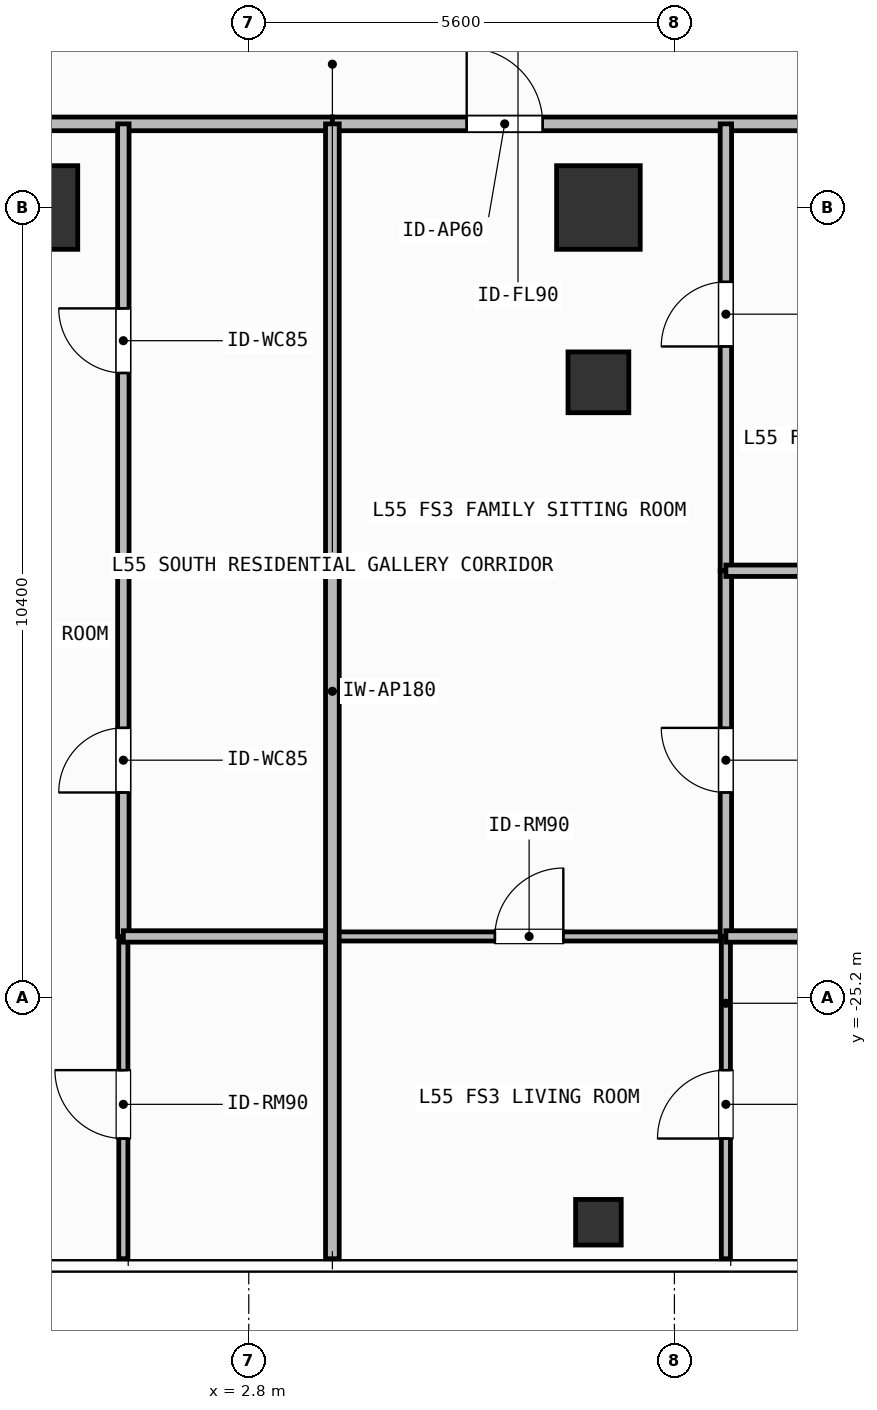
"""IFC4 building model, lengths in metres.
Left out: names, types, materials, properties, quantities, classifications, styles, units other than length and angle.
Written with IfcOpenShell. Run it as: python <this file> out.ifc"""

import sys

from ifc_helpers import new_model, si_unit, direction, frame, frame_2d, origin, origin_2d, place, context, subcontext, project, spatial, rectangle, hollow_rectangle, extrude, element, fill, save


model = new_model("IFC4")
c1 = context("Model", 3, precision=1e-05, world=origin(), true_north=direction((0.0, 1.0)))
c2 = subcontext(c1, "Body", "Model", "MODEL_VIEW")
j1 = project(units=[si_unit("LENGTHUNIT", "METRE"), si_unit("PLANEANGLEUNIT", "RADIAN")], contexts=[c1])
p1 = place(None, origin())
s1 = spatial("IfcSite", under=j1, at=p1, CompositionType="ELEMENT")
p2 = place(p1, origin())
s2 = spatial("IfcBuilding", under=s1, at=p2, CompositionType="ELEMENT")
p3 = place(p2, frame((0.0, 0.0, 223.5)))
s3 = spatial("IfcBuildingStorey", under=s2, at=p3, CompositionType="ELEMENT", Elevation=223.5)
for number, where, z_axis, x_axis in (
    (1, (0.0, -14.8, 0.0), (0.0, 0.0, 1.0), (1.0, 0.0, 0.0)),
    (2, (7.4, -14.8, 0.0), (0.0, 0.0, 1.0), (1.0, 0.0, 0.0)),
):
    element("IfcColumn", number, at=place(p3, frame(where, z_axis=z_axis, x_axis=x_axis)), inside=s3, PredefinedType="COLUMN", context=c2, shape_type="SweptSolid", body=[
        extrude(rectangle(XDim=1.1, YDim=1.1, at=origin_2d()), origin(), (0.0, 0.0, 1.0), 3.9),
    ])
p4 = place(p3, frame((7.4, -17.1, 0.0), z_axis=(0.0, 0.0, 1.0), x_axis=(1.0, 0.0, 0.0)))
e3 = element("IfcColumn", 3, at=p4, inside=s3, PredefinedType="COLUMN", context=c2, shape_type="SweptSolid", body=[
    extrude(hollow_rectangle(XDim=0.8, YDim=0.8, WallThickness=0.036, at=origin_2d()), origin(), (0.0, 0.0, 1.0), 3.9),
])
p5 = place(p3, frame((7.4, -28.15, 0.0), z_axis=(0.0, 0.0, 1.0), x_axis=(1.0, 0.0, 0.0)))
e4 = element("IfcColumn", 4, at=p5, inside=s3, PredefinedType="COLUMN", context=c2, shape_type="SweptSolid", body=[
    extrude(hollow_rectangle(XDim=0.6, YDim=0.6, WallThickness=0.028, at=origin_2d()), origin(), (0.0, 0.0, 1.0), 3.9),
])
p6 = place(p3, frame((-2.154, -13.7, 0.0), z_axis=(0.0, 0.0, 1.0), x_axis=(1.0, 0.0, 0.0)))
e5 = element("IfcWall", 5, at=p6, inside=s3, PredefinedType="PARTITIONING", context=c2, shape_type="SweptSolid", body=[
    extrude(rectangle(XDim=6.054, YDim=0.18, at=frame_2d((3.027, 0.0))), origin(), (0.0, 0.0, 1.0), 3.68),
])
p7 = place(p6, frame((0.511, 0.0, 0.0)))
e6 = element("IfcOpeningElement", 6, at=p7, cuts=e5, PredefinedType="OPENING", context=c2, shape_type="SweptSolid", body=[
    extrude(rectangle(XDim=1.0, YDim=2.2, at=frame_2d((0.5, 1.1))), frame((0.0, 0.1, 0.0), z_axis=(0.0, -1.0, 0.0), x_axis=(1.0, 0.0, 0.0)), (0.0, 0.0, 1.0), 0.2),
])
p8 = place(p3, frame((1.15, -19.579, 0.0), z_axis=(0.0, 0.0, 1.0), x_axis=(0.0, 1.0, 0.0)))
e7 = element("IfcWall", 7, at=p8, inside=s3, PredefinedType="PARTITIONING", context=c2, shape_type="SweptSolid", body=[
    extrude(rectangle(XDim=5.879, YDim=0.15, at=frame_2d((2.939, 0.0))), origin(), (0.0, 0.0, 1.0), 3.68),
])
p9 = place(p8, frame((2.602, 0.0, 0.0)))
e8 = element("IfcOpeningElement", 8, at=p9, cuts=e7, PredefinedType="OPENING", context=c2, shape_type="SweptSolid", body=[
    extrude(rectangle(XDim=0.85, YDim=2.1, at=frame_2d((0.425, 1.05))), frame((0.0, 0.085, 0.0), z_axis=(0.0, -1.0, 0.0), x_axis=(1.0, 0.0, 0.0)), (0.0, 0.0, 1.0), 0.17),
])
p10 = place(p3, frame((1.15, -24.39, 0.0), z_axis=(0.0, 0.0, 1.0), x_axis=(0.0, 1.0, 0.0)))
e9 = element("IfcWall", 9, at=p10, inside=s3, PredefinedType="PARTITIONING", context=c2, shape_type="SweptSolid", body=[
    extrude(rectangle(XDim=4.811, YDim=0.15, at=frame_2d((2.405, 0.0))), origin(), (0.0, 0.0, 1.0), 3.68),
])
p11 = place(p10, frame((1.894, 0.0, 0.0)))
e10 = element("IfcOpeningElement", 10, at=p11, cuts=e9, PredefinedType="OPENING", context=c2, shape_type="SweptSolid", body=[
    extrude(rectangle(XDim=0.85, YDim=2.1, at=frame_2d((0.425, 1.05))), frame((0.0, 0.085, 0.0), z_axis=(0.0, -1.0, 0.0), x_axis=(1.0, 0.0, 0.0)), (0.0, 0.0, 1.0), 0.17),
])
p12 = place(p3, frame((1.15, -28.63, 0.0), z_axis=(0.0, 0.0, 1.0), x_axis=(0.0, 1.0, 0.0)))
e11 = element("IfcWall", 11, at=p12, inside=s3, PredefinedType="PARTITIONING", context=c2, shape_type="SweptSolid", body=[
    extrude(rectangle(XDim=4.24, YDim=0.12, at=frame_2d((2.12, 0.0))), origin(), (0.0, 0.0, 1.0), 3.68),
])
p13 = place(p12, frame((1.581, 0.0, 0.0)))
e12 = element("IfcOpeningElement", 12, at=p13, cuts=e11, PredefinedType="OPENING", context=c2, shape_type="SweptSolid", body=[
    extrude(rectangle(XDim=0.9, YDim=2.1, at=frame_2d((0.45, 1.05))), frame((0.0, 0.07, 0.0), z_axis=(0.0, -1.0, 0.0), x_axis=(1.0, 0.0, 0.0)), (0.0, 0.0, 1.0), 0.14),
])
p14 = place(p3, frame((3.9, -13.7, 0.0), z_axis=(0.0, 0.0, 1.0), x_axis=(1.0, 0.0, 0.0)))
e13 = element("IfcWall", 13, at=p14, inside=s3, PredefinedType="PARTITIONING", context=c2, shape_type="SweptSolid", body=[
    extrude(rectangle(XDim=7.927, YDim=0.18, at=frame_2d((3.963, 0.0))), origin(), (0.0, 0.0, 1.0), 3.68),
])
p15 = place(p14, frame((1.767, 0.0, 0.0)))
e14 = element("IfcOpeningElement", 14, at=p15, cuts=e13, PredefinedType="OPENING", context=c2, shape_type="SweptSolid", body=[
    extrude(rectangle(XDim=1.0, YDim=2.2, at=frame_2d((0.5, 1.1))), frame((0.0, 0.1, 0.0), z_axis=(0.0, -1.0, 0.0), x_axis=(1.0, 0.0, 0.0)), (0.0, 0.0, 1.0), 0.2),
])
p16 = place(p3, frame((3.9, -24.39, 0.0), z_axis=(0.0, 0.0, 1.0), x_axis=(1.0, 0.0, 0.0)))
e15 = element("IfcWall", 15, at=p16, inside=s3, PredefinedType="PARTITIONING", context=c2, shape_type="SweptSolid", body=[
    extrude(rectangle(XDim=5.177, YDim=0.12, at=frame_2d((2.588, 0.0))), origin(), (0.0, 0.0, 1.0), 3.68),
])
p17 = place(p16, frame((2.138, 0.0, 0.0)))
e16 = element("IfcOpeningElement", 16, at=p17, cuts=e15, PredefinedType="OPENING", context=c2, shape_type="SweptSolid", body=[
    extrude(rectangle(XDim=0.9, YDim=2.1, at=frame_2d((0.45, 1.05))), frame((0.0, 0.07, 0.0), z_axis=(0.0, -1.0, 0.0), x_axis=(1.0, 0.0, 0.0)), (0.0, 0.0, 1.0), 0.14),
])
p18 = place(p3, frame((9.077, -19.579, 0.0), z_axis=(0.0, 0.0, 1.0), x_axis=(0.0, 1.0, 0.0)))
e17 = element("IfcWall", 17, at=p18, inside=s3, PredefinedType="PARTITIONING", context=c2, shape_type="SweptSolid", body=[
    extrude(rectangle(XDim=5.879, YDim=0.15, at=frame_2d((2.939, 0.0))), origin(), (0.0, 0.0, 1.0), 3.68),
])
p19 = place(p18, frame((2.95, 0.0, 0.0)))
e18 = element("IfcOpeningElement", 18, at=p19, cuts=e17, PredefinedType="OPENING", context=c2, shape_type="SweptSolid", body=[
    extrude(rectangle(XDim=0.85, YDim=2.1, at=frame_2d((0.425, 1.05))), frame((0.0, 0.085, 0.0), z_axis=(0.0, -1.0, 0.0), x_axis=(1.0, 0.0, 0.0)), (0.0, 0.0, 1.0), 0.17),
])
p20 = place(p3, frame((9.077, -24.39, 0.0), z_axis=(0.0, 0.0, 1.0), x_axis=(0.0, 1.0, 0.0)))
e19 = element("IfcWall", 19, at=p20, inside=s3, PredefinedType="PARTITIONING", context=c2, shape_type="SweptSolid", body=[
    extrude(rectangle(XDim=4.811, YDim=0.15, at=frame_2d((2.405, 0.0))), origin(), (0.0, 0.0, 1.0), 3.68),
])
p21 = place(p20, frame((1.894, 0.0, 0.0)))
e20 = element("IfcOpeningElement", 20, at=p21, cuts=e19, PredefinedType="OPENING", context=c2, shape_type="SweptSolid", body=[
    extrude(rectangle(XDim=0.85, YDim=2.1, at=frame_2d((0.425, 1.05))), frame((0.0, 0.085, 0.0), z_axis=(0.0, -1.0, 0.0), x_axis=(1.0, 0.0, 0.0)), (0.0, 0.0, 1.0), 0.17),
])
p22 = place(p3, frame((9.077, -28.63, 0.0), z_axis=(0.0, 0.0, 1.0), x_axis=(0.0, 1.0, 0.0)))
e21 = element("IfcWall", 21, at=p22, inside=s3, PredefinedType="PARTITIONING", context=c2, shape_type="SweptSolid", body=[
    extrude(rectangle(XDim=4.24, YDim=0.12, at=frame_2d((2.12, 0.0))), origin(), (0.0, 0.0, 1.0), 3.68),
])
p23 = place(p22, frame((1.581, 0.0, 0.0)))
e22 = element("IfcOpeningElement", 22, at=p23, cuts=e21, PredefinedType="OPENING", context=c2, shape_type="SweptSolid", body=[
    extrude(rectangle(XDim=0.9, YDim=2.1, at=frame_2d((0.45, 1.05))), frame((0.0, 0.07, 0.0), z_axis=(0.0, -1.0, 0.0), x_axis=(1.0, 0.0, 0.0)), (0.0, 0.0, 1.0), 0.14),
])
for number, where, z_axis, x_axis in (
    (23, (1.15, -19.579, 0.0), (0.0, 0.0, 1.0), (1.0, 0.0, 0.0)),
    (24, (1.15, -24.39, 0.0), (0.0, 0.0, 1.0), (1.0, 0.0, 0.0)),
    (25, (9.077, -19.579, 0.0), (0.0, 0.0, 1.0), (1.0, 0.0, 0.0)),
    (26, (9.077, -24.39, 0.0), (0.0, 0.0, 1.0), (1.0, 0.0, 0.0)),
):
    element("IfcWall", number, at=place(p3, frame(where, z_axis=z_axis, x_axis=x_axis)), inside=s3, PredefinedType="PARTITIONING", context=c2, shape_type="SweptSolid", body=[
        extrude(rectangle(XDim=2.75, YDim=0.15, at=frame_2d((1.375, 0.0))), origin(), (0.0, 0.0, 1.0), 3.68),
    ])
p24 = place(p3, frame((3.9, -28.63, 0.0), z_axis=(0.0, 0.0, 1.0), x_axis=(0.0, 1.0, 0.0)))
e27 = element("IfcWall", 27, at=p24, inside=s3, PredefinedType="PARTITIONING", context=c2, shape_type="SweptSolid", body=[
    extrude(rectangle(XDim=14.93, YDim=0.18, at=frame_2d((7.465, 0.0))), origin(), (0.0, 0.0, 1.0), 3.68),
])
p25 = place(p9, origin())
e28 = element("IfcDoor", 28, at=p25, inside=s3, OperationType="SINGLE_SWING_RIGHT", PredefinedType="DOOR", context=c2, shape_type="SweptSolid", body=[
    extrude(rectangle(XDim=0.85, YDim=2.1, at=frame_2d((0.425, 1.05))), frame((0.0, 0.025, 0.0), z_axis=(0.0, -1.0, 0.0), x_axis=(1.0, 0.0, 0.0)), (0.0, 0.0, 1.0), 0.05),
])
fill(e8, e28)
p26 = place(p11, origin())
e29 = element("IfcDoor", 29, at=p26, inside=s3, OperationType="SINGLE_SWING_LEFT", PredefinedType="DOOR", context=c2, shape_type="SweptSolid", body=[
    extrude(rectangle(XDim=0.85, YDim=2.1, at=frame_2d((0.425, 1.05))), frame((0.0, 0.025, 0.0), z_axis=(0.0, -1.0, 0.0), x_axis=(1.0, 0.0, 0.0)), (0.0, 0.0, 1.0), 0.05),
])
fill(e10, e29)
p27 = place(p13, origin())
e30 = element("IfcDoor", 30, at=p27, inside=s3, OperationType="SINGLE_SWING_RIGHT", PredefinedType="DOOR", context=c2, shape_type="SweptSolid", body=[
    extrude(rectangle(XDim=0.9, YDim=2.1, at=frame_2d((0.45, 1.05))), frame((0.0, 0.025, 0.0), z_axis=(0.0, -1.0, 0.0), x_axis=(1.0, 0.0, 0.0)), (0.0, 0.0, 1.0), 0.05),
])
fill(e12, e30)
p28 = place(p15, origin())
e31 = element("IfcDoor", 31, at=p28, inside=s3, OperationType="SINGLE_SWING_LEFT", PredefinedType="DOOR", context=c2, shape_type="SweptSolid", body=[
    extrude(rectangle(XDim=1.0, YDim=2.2, at=frame_2d((0.5, 1.1))), frame((0.0, 0.025, 0.0), z_axis=(0.0, -1.0, 0.0), x_axis=(1.0, 0.0, 0.0)), (0.0, 0.0, 1.0), 0.05),
])
fill(e14, e31)
p29 = place(p17, origin())
e32 = element("IfcDoor", 32, at=p29, inside=s3, OperationType="SINGLE_SWING_RIGHT", PredefinedType="DOOR", context=c2, shape_type="SweptSolid", body=[
    extrude(rectangle(XDim=0.9, YDim=2.1, at=frame_2d((0.45, 1.05))), frame((0.0, 0.025, 0.0), z_axis=(0.0, -1.0, 0.0), x_axis=(1.0, 0.0, 0.0)), (0.0, 0.0, 1.0), 0.05),
])
fill(e16, e32)
p30 = place(p19, origin())
e33 = element("IfcDoor", 33, at=p30, inside=s3, OperationType="SINGLE_SWING_LEFT", PredefinedType="DOOR", context=c2, shape_type="SweptSolid", body=[
    extrude(rectangle(XDim=0.85, YDim=2.1, at=frame_2d((0.425, 1.05))), frame((0.0, 0.025, 0.0), z_axis=(0.0, -1.0, 0.0), x_axis=(1.0, 0.0, 0.0)), (0.0, 0.0, 1.0), 0.05),
])
fill(e18, e33)
p31 = place(p21, origin())
e34 = element("IfcDoor", 34, at=p31, inside=s3, OperationType="SINGLE_SWING_RIGHT", PredefinedType="DOOR", context=c2, shape_type="SweptSolid", body=[
    extrude(rectangle(XDim=0.85, YDim=2.1, at=frame_2d((0.425, 1.05))), frame((0.0, 0.025, 0.0), z_axis=(0.0, -1.0, 0.0), x_axis=(1.0, 0.0, 0.0)), (0.0, 0.0, 1.0), 0.05),
])
fill(e20, e34)
p32 = place(p23, origin())
e35 = element("IfcDoor", 35, at=p32, inside=s3, OperationType="SINGLE_SWING_LEFT", PredefinedType="DOOR", context=c2, shape_type="SweptSolid", body=[
    extrude(rectangle(XDim=0.9, YDim=2.1, at=frame_2d((0.45, 1.05))), frame((0.0, 0.025, 0.0), z_axis=(0.0, -1.0, 0.0), x_axis=(1.0, 0.0, 0.0)), (0.0, 0.0, 1.0), 0.05),
])
fill(e22, e35)
save(model, sys.argv[1])
